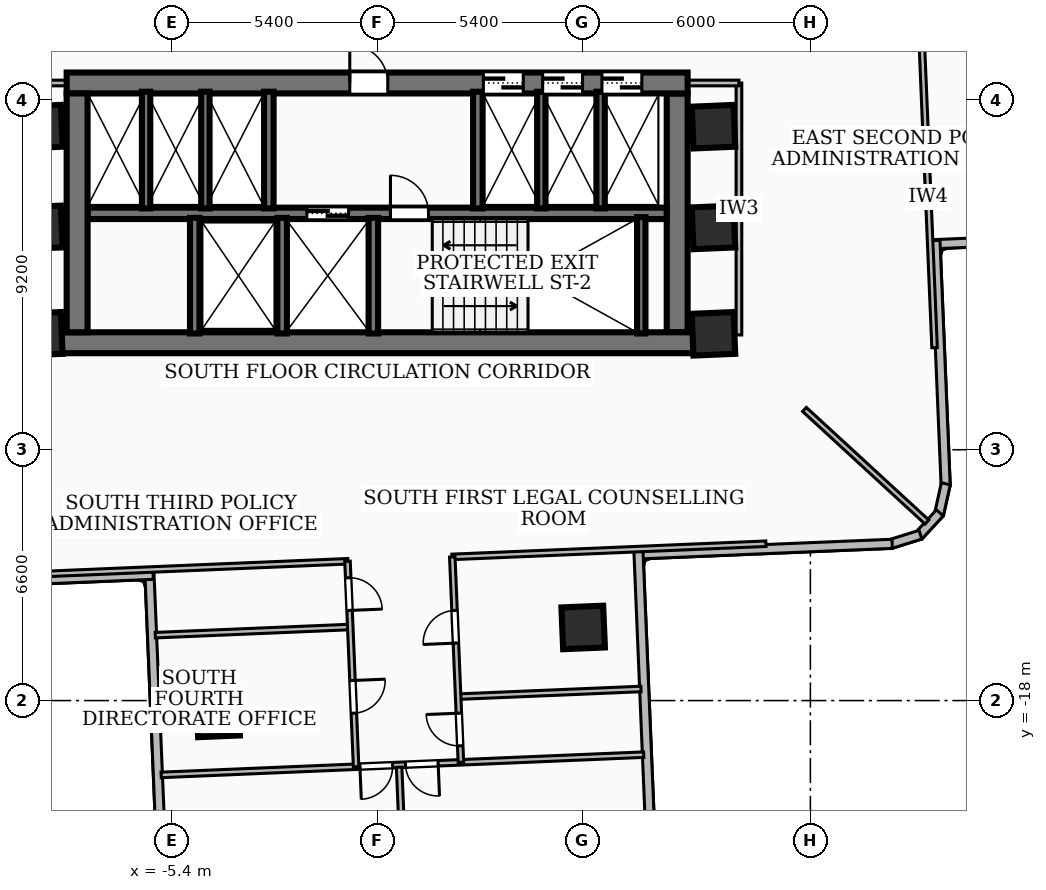
"""IFC4 building model, lengths in metres.
Left out: names, types, materials, properties, quantities, classifications, styles, units other than length and angle.
Written with IfcOpenShell. Run it as: python <this file> out.ifc"""

import sys

from ifc_helpers import new_model, si_unit, direction, frame, frame_2d, origin, origin_2d, place, context, subcontext, project, spatial, rectangle, extrude, element, fill, save


model = new_model("IFC4")
c1 = context("Model", 3, precision=1e-05, world=origin(), true_north=direction((0.0, 1.0)))
c2 = subcontext(c1, "Body", "Model", "MODEL_VIEW")
j1 = project(units=[si_unit("LENGTHUNIT", "METRE"), si_unit("PLANEANGLEUNIT", "RADIAN")], contexts=[c1])
p1 = place(None, origin())
s1 = spatial("IfcSite", under=j1, at=p1, CompositionType="ELEMENT")
p2 = place(p1, origin())
s2 = spatial("IfcBuilding", under=s1, at=p2, CompositionType="ELEMENT")
p3 = place(p2, frame((0.0, 0.0, 46.08)))
s3 = spatial("IfcBuildingStorey", under=s2, at=p3, CompositionType="ELEMENT", Elevation=46.08)
p4 = place(p3, frame((8.78, -8.585, 0.0), z_axis=(0.0, 0.0, 1.0), x_axis=(-1.0, 0.0, 0.0)))
e1 = element("IfcWall", 1, at=p4, inside=s3, PredefinedType="SHEAR", context=c2, shape_type="SweptSolid", body=[
    extrude(rectangle(XDim=17.56, YDim=0.55, at=frame_2d((8.78, 0.0))), origin(), (0.0, 0.0, 1.0), 3.32),
])
p5 = place(p3, frame((-8.17, -1.75, 0.0), z_axis=(0.0, 0.0, 1.0), x_axis=(1.0, 0.0, 0.0)))
e2 = element("IfcWall", 2, at=p5, inside=s3, PredefinedType="SHEAR", context=c2, shape_type="SweptSolid", body=[
    extrude(rectangle(XDim=16.34, YDim=0.55, at=frame_2d((8.17, 0.0))), origin(), (0.0, 0.0, 1.0), 3.32),
])
p6 = place(p5, frame((7.45, 0.0, 0.0)))
e3 = element("IfcOpeningElement", 3, at=p6, cuts=e2, PredefinedType="OPENING", context=c2, shape_type="SweptSolid", body=[
    extrude(rectangle(XDim=1.0, YDim=2.1, at=frame_2d((0.5, 1.05))), frame((0.0, 0.285, 0.0), z_axis=(0.0, -1.0, 0.0), x_axis=(1.0, 0.0, 0.0)), (0.0, 0.0, 1.0), 0.57),
])
p7 = place(p5, frame((10.965, 0.0, 0.0)))
e4 = element("IfcOpeningElement", 4, at=p7, cuts=e2, PredefinedType="OPENING", context=c2, shape_type="SweptSolid", body=[
    extrude(rectangle(XDim=1.05, YDim=2.15, at=frame_2d((0.525, 1.075))), frame((0.0, 0.285, 0.0), z_axis=(0.0, -1.0, 0.0), x_axis=(1.0, 0.0, 0.0)), (0.0, 0.0, 1.0), 0.57),
])
p8 = place(p5, frame((12.525, 0.0, 0.0)))
e5 = element("IfcOpeningElement", 5, at=p8, cuts=e2, PredefinedType="OPENING", context=c2, shape_type="SweptSolid", body=[
    extrude(rectangle(XDim=1.05, YDim=2.15, at=frame_2d((0.525, 1.075))), frame((0.0, 0.285, 0.0), z_axis=(0.0, -1.0, 0.0), x_axis=(1.0, 0.0, 0.0)), (0.0, 0.0, 1.0), 0.57),
])
p9 = place(p5, frame((14.085, 0.0, 0.0)))
e6 = element("IfcOpeningElement", 6, at=p9, cuts=e2, PredefinedType="OPENING", context=c2, shape_type="SweptSolid", body=[
    extrude(rectangle(XDim=1.05, YDim=2.15, at=frame_2d((0.525, 1.075))), frame((0.0, 0.285, 0.0), z_axis=(0.0, -1.0, 0.0), x_axis=(1.0, 0.0, 0.0)), (0.0, 0.0, 1.0), 0.57),
])
for number, where, z_axis, x_axis in (
    (7, (-7.895, -8.31, 0.0), (0.0, 0.0, 1.0), (0.0, 1.0, 0.0)),
    (8, (7.895, -2.025, 0.0), (0.0, 0.0, 1.0), (0.0, -1.0, 0.0)),
):
    element("IfcWall", number, at=place(p3, frame(where, z_axis=z_axis, x_axis=x_axis)), inside=s3, PredefinedType="SHEAR", context=c2, shape_type="SweptSolid", body=[
        extrude(rectangle(XDim=6.285, YDim=0.55, at=frame_2d((3.143, 0.0))), origin(), (0.0, 0.0, 1.0), 3.32),
    ])
p10 = place(p3, frame((-7.62, -5.18, 0.0), z_axis=(0.0, 0.0, 1.0), x_axis=(1.0, 0.0, 0.0)))
e9 = element("IfcWall", 9, at=p10, inside=s3, PredefinedType="SOLIDWALL", context=c2, shape_type="SweptSolid", body=[
    extrude(rectangle(XDim=15.24, YDim=0.3, at=frame_2d((7.62, 0.0))), origin(), (0.0, 0.0, 1.0), 3.32),
])
p11 = place(p10, frame((5.77, 0.0, 0.0)))
e10 = element("IfcOpeningElement", 10, at=p11, cuts=e9, PredefinedType="OPENING", context=c2, shape_type="SweptSolid", body=[
    extrude(rectangle(XDim=1.1, YDim=2.15, at=frame_2d((0.55, 1.075))), frame((0.0, 0.16, 0.0), z_axis=(0.0, -1.0, 0.0), x_axis=(1.0, 0.0, 0.0)), (0.0, 0.0, 1.0), 0.32),
])
p12 = place(p10, frame((7.97, 0.0, 0.0)))
e11 = element("IfcOpeningElement", 11, at=p12, cuts=e9, PredefinedType="OPENING", context=c2, shape_type="SweptSolid", body=[
    extrude(rectangle(XDim=1.0, YDim=2.1, at=frame_2d((0.5, 1.05))), frame((0.0, 0.16, 0.0), z_axis=(0.0, -1.0, 0.0), x_axis=(1.0, 0.0, 0.0)), (0.0, 0.0, 1.0), 0.32),
])
p13 = place(p3, frame((6.95, -8.34, 0.0), z_axis=(0.0, 0.0, 1.0), x_axis=(0.0, 1.0, 0.0)))
e12 = element("IfcWall", 12, at=p13, inside=s3, PredefinedType="SOLIDWALL", context=c2, shape_type="SweptSolid", body=[
    extrude(rectangle(XDim=3.06, YDim=0.22, at=frame_2d((1.53, 0.0))), origin(), (0.0, 0.0, 1.0), 3.32),
])
for number, where, z_axis, x_axis in (
    (13, (-0.1, -8.34, 0.0), (0.0, 0.0, 1.0), (0.0, 1.0, 0.0)),
    (14, (-2.5, -8.34, 0.0), (0.0, 0.0, 1.0), (0.0, 1.0, 0.0)),
    (15, (-4.8, -8.34, 0.0), (0.0, 0.0, 1.0), (0.0, 1.0, 0.0)),
):
    element("IfcWall", number, at=place(p3, frame(where, z_axis=z_axis, x_axis=x_axis)), inside=s3, PredefinedType="SOLIDWALL", context=c2, shape_type="SweptSolid", body=[
        extrude(rectangle(XDim=3.04, YDim=0.25, at=frame_2d((1.52, 0.0))), origin(), (0.0, 0.0, 1.0), 3.32),
    ])
for number, where, z_axis, x_axis in (
    (16, (-2.85, -5.05, 0.0), (0.0, 0.0, 1.0), (0.0, 1.0, 0.0)),
    (17, (2.65, -5.05, 0.0), (0.0, 0.0, 1.0), (0.0, 1.0, 0.0)),
):
    element("IfcWall", number, at=place(p3, frame(where, z_axis=z_axis, x_axis=x_axis)), inside=s3, PredefinedType="SOLIDWALL", context=c2, shape_type="SweptSolid", body=[
        extrude(rectangle(XDim=3.07, YDim=0.25, at=frame_2d((1.535, 0.0))), origin(), (0.0, 0.0, 1.0), 3.32),
    ])
for number, where, z_axis, x_axis in (
    (18, (4.32, -5.05, 0.0), (0.0, 0.0, 1.0), (0.0, 1.0, 0.0)),
    (19, (5.88, -5.05, 0.0), (0.0, 0.0, 1.0), (0.0, 1.0, 0.0)),
    (20, (-6.08, -5.05, 0.0), (0.0, 0.0, 1.0), (0.0, 1.0, 0.0)),
    (21, (-4.52, -5.05, 0.0), (0.0, 0.0, 1.0), (0.0, 1.0, 0.0)),
):
    element("IfcWall", number, at=place(p3, frame(where, z_axis=z_axis, x_axis=x_axis)), inside=s3, PredefinedType="SOLIDWALL", context=c2, shape_type="SweptSolid", body=[
        extrude(rectangle(XDim=3.07, YDim=0.22, at=frame_2d((1.535, 0.0))), origin(), (0.0, 0.0, 1.0), 3.32),
    ])
for number, where, z_axis, x_axis in (
    (22, (-8.85, -5.55, 0.0), (0.0, 0.0, 1.0), (0.999, 0.042, 0.0)),
    (23, (-8.85, -2.9, 0.0), (0.0, 0.0, 1.0), (0.999, 0.042, 0.0)),
    (24, (8.85, -5.55, 0.0), (0.0, 0.0, 1.0), (0.999, 0.042, 0.0)),
    (25, (8.85, -2.9, 0.0), (0.0, 0.0, 1.0), (0.999, 0.042, 0.0)),
    (26, (8.85, -8.35, 0.0), (0.0, 0.0, 1.0), (0.999, 0.042, 0.0)),
    (27, (-8.85, -8.35, 0.0), (0.0, 0.0, 1.0), (0.999, 0.042, 0.0)),
    (28, (-4.184, -18.391, 0.0), (0.0, 0.0, 1.0), (0.999, 0.042, 0.0)),
    (29, (5.421, -16.076, 0.0), (0.0, 0.0, 1.0), (0.999, 0.042, 0.0)),
):
    element("IfcColumn", number, at=place(p3, frame(where, z_axis=z_axis, x_axis=x_axis)), inside=s3, PredefinedType="COLUMN", context=c2, shape_type="SweptSolid", body=[
        extrude(rectangle(XDim=1.1, YDim=1.1, at=origin_2d()), origin(), (0.0, 0.0, 1.0), 3.6),
    ])
p14 = place(p3, frame((31.458, -5.287, 0.0), z_axis=(0.0, 0.0, 1.0), x_axis=(-0.999122484842, -0.041883890494, 0.0)))
e30 = element("IfcWall", 30, at=p14, inside=s3, PredefinedType="SOLIDWALL", context=c2, shape_type="SweptSolid", body=[
    extrude(rectangle(XDim=16.875, YDim=0.24, at=frame_2d((8.438, 0.0))), origin(), (0.0, 0.0, 1.0), 3.32),
])
p15 = place(p14, frame((1.1, 0.0, 0.85)))
e31 = element("IfcOpeningElement", 31, at=p15, cuts=e30, PredefinedType="OPENING", context=c2, shape_type="SweptSolid", body=[
    extrude(rectangle(XDim=2.7, YDim=2.1, at=frame_2d((1.35, 1.05))), frame((0.0, 0.13, 0.0), z_axis=(0.0, -1.0, 0.0), x_axis=(1.0, 0.0, 0.0)), (0.0, 0.0, 1.0), 0.26),
])
p16 = place(p3, frame((14.69, -5.894, 0.0), z_axis=(0.0, 0.0, 1.0), x_axis=(0.041827173477, -0.999124860845, 0.0)))
e32 = element("IfcWall", 32, at=p16, inside=s3, PredefinedType="SOLIDWALL", context=c2, shape_type="SweptSolid", body=[
    extrude(rectangle(XDim=6.456, YDim=0.24, at=frame_2d((3.228, 0.0))), origin(), (0.0, 0.0, 1.0), 3.32),
])
p17 = place(p3, frame((14.964, -12.295, 0.0), z_axis=(0.0, 0.0, 1.0), x_axis=(-0.21736704137, -0.976089939158, 0.0)))
e33 = element("IfcWall", 33, at=p17, inside=s3, PredefinedType="SOLIDWALL", context=c2, shape_type="SweptSolid", body=[
    extrude(rectangle(XDim=0.829, YDim=0.24, at=frame_2d((0.415, 0.0))), origin(), (0.0, 0.0, 1.0), 3.32),
])
p18 = place(p3, frame((14.806, -13.062, 0.0), z_axis=(0.0, 0.0, 1.0), x_axis=(-0.677693750404, -0.735344259965, 0.0)))
e34 = element("IfcWall", 34, at=p18, inside=s3, PredefinedType="SOLIDWALL", context=c2, shape_type="SweptSolid", body=[
    extrude(rectangle(XDim=0.813, YDim=0.24, at=frame_2d((0.406, 0.0))), origin(), (0.0, 0.0, 1.0), 3.32),
])
p19 = place(p3, frame((14.296, -13.635, 0.0), z_axis=(0.0, 0.0, 1.0), x_axis=(-0.954396284631, -0.298542680168, 0.0)))
e35 = element("IfcWall", 35, at=p19, inside=s3, PredefinedType="SOLIDWALL", context=c2, shape_type="SweptSolid", body=[
    extrude(rectangle(XDim=0.831, YDim=0.24, at=frame_2d((0.416, 0.0))), origin(), (0.0, 0.0, 1.0), 3.32),
])
p20 = place(p3, frame((13.552, -13.875, 0.0), z_axis=(0.0, 0.0, 1.0), x_axis=(-0.999127443157, -0.041765444226, 0.0)))
e36 = element("IfcWall", 36, at=p20, inside=s3, PredefinedType="SOLIDWALL", context=c2, shape_type="SweptSolid", body=[
    extrude(rectangle(XDim=6.775, YDim=0.24, at=frame_2d((3.387, 0.0))), origin(), (0.0, 0.0, 1.0), 3.32),
])
p21 = place(p3, frame((6.875, -14.058, 0.0), z_axis=(0.0, 0.0, 1.0), x_axis=(0.041850586852, -0.999123880397, 0.0)))
e37 = element("IfcWall", 37, at=p21, inside=s3, PredefinedType="SOLIDWALL", context=c2, shape_type="SweptSolid", body=[
    extrude(rectangle(XDim=13.476, YDim=0.24, at=frame_2d((6.738, 0.0))), origin(), (0.0, 0.0, 1.0), 3.32),
])
p22 = place(p21, frame((10.276, 0.0, 0.85)))
e38 = element("IfcOpeningElement", 38, at=p22, cuts=e37, PredefinedType="OPENING", context=c2, shape_type="SweptSolid", body=[
    extrude(rectangle(XDim=2.1, YDim=1.6, at=frame_2d((1.05, 0.8))), frame((0.0, 0.13, 0.0), z_axis=(0.0, -1.0, 0.0), x_axis=(1.0, 0.0, 0.0)), (0.0, 0.0, 1.0), 0.26),
])
p23 = place(p3, frame((-5.43, -28.061, 0.0), z_axis=(0.0, 0.0, 1.0), x_axis=(-0.041852859621, 0.999123785195, 0.0)))
e39 = element("IfcWall", 39, at=p23, inside=s3, PredefinedType="SOLIDWALL", context=c2, shape_type="SweptSolid", body=[
    extrude(rectangle(XDim=13.475, YDim=0.24, at=frame_2d((6.737, 0.0))), origin(), (0.0, 0.0, 1.0), 2.401),
])
p24 = place(p3, frame((-5.894, -14.69, 0.0), z_axis=(0.0, 0.0, 1.0), x_axis=(-0.999124860845, -0.041827173477, 0.0)))
e40 = element("IfcWall", 40, at=p24, inside=s3, PredefinedType="SOLIDWALL", context=c2, shape_type="SweptSolid", body=[
    extrude(rectangle(XDim=6.456, YDim=0.24, at=frame_2d((3.228, 0.0))), origin(), (0.0, 0.0, 1.0), 2.401),
])
p25 = place(p3, frame((-7.85, -1.75, 0.0), z_axis=(0.0, 0.0, 1.0), x_axis=(-1.0, 0.0, 0.0)))
e41 = element("IfcWall", 41, at=p25, inside=s3, PredefinedType="PARTITIONING", context=c2, shape_type="SweptSolid", body=[
    extrude(rectangle(XDim=1.67, YDim=0.15, at=frame_2d((0.835, 0.0))), origin(), (0.0, 0.0, 1.0), 2.385),
])
p26 = place(p3, frame((9.52, -8.38, 0.0), z_axis=(0.0, 0.0, 1.0), x_axis=(0.0, 1.0, 0.0)))
e42 = element("IfcWall", 42, at=p26, inside=s3, PredefinedType="PARTITIONING", context=c2, shape_type="SweptSolid", body=[
    extrude(rectangle(XDim=6.63, YDim=0.15, at=frame_2d((3.315, 0.0))), origin(), (0.0, 0.0, 1.0), 2.401),
])
p27 = place(p3, frame((7.85, -1.75, 0.0), z_axis=(0.0, 0.0, 1.0), x_axis=(1.0, 0.0, 0.0)))
e43 = element("IfcWall", 43, at=p27, inside=s3, PredefinedType="PARTITIONING", context=c2, shape_type="SweptSolid", body=[
    extrude(rectangle(XDim=1.67, YDim=0.15, at=frame_2d((0.835, 0.0))), origin(), (0.0, 0.0, 1.0), 2.385),
])
p28 = place(p3, frame((11.245, -10.34, 0.0), z_axis=(0.0, 0.0, 1.0), x_axis=(0.736178820698, -0.676787074312, 0.0)))
e44 = element("IfcWall", 44, at=p28, inside=s3, PredefinedType="PARTITIONING", context=c2, shape_type="SweptSolid", body=[
    extrude(rectangle(XDim=4.378, YDim=0.145, at=frame_2d((2.189, 0.0))), origin(), (0.0, 0.0, 1.0), 3.32),
])
p29 = place(p3, frame((14.668, -8.714, 0.0), z_axis=(0.0, 0.0, 1.0), x_axis=(-0.041882146625, 0.999122557945, 0.0)))
e45 = element("IfcWall", 45, at=p29, inside=s3, PredefinedType="PARTITIONING", context=c2, shape_type="SweptSolid", body=[
    extrude(rectangle(XDim=7.951, YDim=0.145, at=frame_2d((3.976, 0.0))), origin(), (0.0, 0.0, 1.0), 2.401),
])
p30 = place(p3, frame((1.967, -14.22, 0.0), z_axis=(0.0, 0.0, 1.0), x_axis=(0.99911977153, 0.041948565382, 0.0)))
e46 = element("IfcWall", 46, at=p30, inside=s3, PredefinedType="PARTITIONING", context=c2, shape_type="SweptSolid", body=[
    extrude(rectangle(XDim=8.27, YDim=0.145, at=frame_2d((4.135, 0.0))), origin(), (0.0, 0.0, 1.0), 2.401),
])
p31 = place(p3, frame((-8.714, -14.668, 0.0), z_axis=(0.0, 0.0, 1.0), x_axis=(0.999122557945, 0.041882146625, 0.0)))
e47 = element("IfcWall", 47, at=p31, inside=s3, PredefinedType="PARTITIONING", context=c2, shape_type="SweptSolid", body=[
    extrude(rectangle(XDim=7.951, YDim=0.145, at=frame_2d((3.976, 0.0))), origin(), (0.0, 0.0, 1.0), 2.401),
])
p32 = place(p3, frame((2.151, -17.896, 0.0), z_axis=(0.0, 0.0, 1.0), x_axis=(0.999121741873, 0.041901609945, 0.0)))
e48 = element("IfcWall", 48, at=p32, inside=s3, PredefinedType="PARTITIONING", context=c2, shape_type="SweptSolid", body=[
    extrude(rectangle(XDim=4.795, YDim=0.145, at=frame_2d((2.397, 0.0))), origin(), (0.0, 0.0, 1.0), 2.401),
])
p33 = place(p3, frame((-5.838, -16.279, 0.0), z_axis=(0.0, 0.0, 1.0), x_axis=(0.999123283233, 0.041864840869, 0.0)))
e49 = element("IfcWall", 49, at=p33, inside=s3, PredefinedType="PARTITIONING", context=c2, shape_type="SweptSolid", body=[
    extrude(rectangle(XDim=5.114, YDim=0.145, at=frame_2d((2.557, 0.0))), origin(), (0.0, 0.0, 1.0), 2.401),
])
p34 = place(p3, frame((2.204, -19.625, 0.0), z_axis=(0.0, 0.0, 1.0), x_axis=(-0.041970303018, 0.999118858627, 0.0)))
e50 = element("IfcWall", 50, at=p34, inside=s3, PredefinedType="PARTITIONING", context=c2, shape_type="SweptSolid", body=[
    extrude(rectangle(XDim=5.41, YDim=0.145, at=frame_2d((2.705, 0.0))), origin(), (0.0, 0.0, 1.0), 3.32),
])
p35 = place(p34, frame((3.14, 0.0, 0.0)))
e51 = element("IfcOpeningElement", 51, at=p35, cuts=e50, PredefinedType="OPENING", context=c2, shape_type="SweptSolid", body=[
    extrude(rectangle(XDim=0.86, YDim=2.04, at=frame_2d((0.43, 1.02))), frame((0.0, 0.083, 0.0), z_axis=(0.0, -1.0, 0.0), x_axis=(1.0, 0.0, 0.0)), (0.0, 0.0, 1.0), 0.165),
])
p36 = place(p34, frame((0.435, 0.0, 0.0)))
e52 = element("IfcOpeningElement", 52, at=p36, cuts=e50, PredefinedType="OPENING", context=c2, shape_type="SweptSolid", body=[
    extrude(rectangle(XDim=0.86, YDim=2.04, at=frame_2d((0.43, 1.02))), frame((0.0, 0.083, 0.0), z_axis=(0.0, -1.0, 0.0), x_axis=(1.0, 0.0, 0.0)), (0.0, 0.0, 1.0), 0.165),
])
p37 = place(p3, frame((-0.78, -14.335, 0.0), z_axis=(0.0, 0.0, 1.0), x_axis=(0.041782565573, -0.999126727304, 0.0)))
e53 = element("IfcWall", 53, at=p37, inside=s3, PredefinedType="PARTITIONING", context=c2, shape_type="SweptSolid", body=[
    extrude(rectangle(XDim=5.411, YDim=0.145, at=frame_2d((2.705, 0.0))), origin(), (0.0, 0.0, 1.0), 3.32),
])
p38 = place(p37, frame((0.435, 0.0, 0.0)))
e54 = element("IfcOpeningElement", 54, at=p38, cuts=e53, PredefinedType="OPENING", context=c2, shape_type="SweptSolid", body=[
    extrude(rectangle(XDim=0.86, YDim=2.04, at=frame_2d((0.43, 1.02))), frame((0.0, 0.083, 0.0), z_axis=(0.0, -1.0, 0.0), x_axis=(1.0, 0.0, 0.0)), (0.0, 0.0, 1.0), 0.165),
])
p39 = place(p37, frame((3.14, 0.0, 0.0)))
e55 = element("IfcOpeningElement", 55, at=p39, cuts=e53, PredefinedType="OPENING", context=c2, shape_type="SweptSolid", body=[
    extrude(rectangle(XDim=0.86, YDim=2.04, at=frame_2d((0.43, 1.02))), frame((0.0, 0.083, 0.0), z_axis=(0.0, -1.0, 0.0), x_axis=(1.0, 0.0, 0.0)), (0.0, 0.0, 1.0), 0.165),
])
p40 = place(p3, frame((0.578, -19.753, 0.0), z_axis=(0.0, 0.0, 1.0), x_axis=(0.041866246522, -0.999123224333, 0.0)))
e56 = element("IfcWall", 56, at=p40, inside=s3, PredefinedType="PARTITIONING", context=c2, shape_type="SweptSolid", body=[
    extrude(rectangle(XDim=9.435, YDim=0.145, at=frame_2d((4.718, 0.0))), origin(), (0.0, 0.0, 1.0), 2.812),
])
p41 = place(p3, frame((7.015, -19.423, 0.0), z_axis=(0.0, 0.0, 1.0), x_axis=(-0.99912047737, -0.041931750497, 0.0)))
e57 = element("IfcWall", 57, at=p41, inside=s3, PredefinedType="PARTITIONING", context=c2, shape_type="SweptSolid", body=[
    extrude(rectangle(XDim=12.71, YDim=0.145, at=frame_2d((6.355, 0.0))), origin(), (0.0, 0.0, 1.0), 2.401),
])
p42 = place(p41, frame((6.615, 0.0, 0.0)))
e58 = element("IfcOpeningElement", 58, at=p42, cuts=e57, PredefinedType="OPENING", context=c2, shape_type="SweptSolid", body=[
    extrude(rectangle(XDim=0.86, YDim=2.04, at=frame_2d((0.43, 1.02))), frame((0.0, 0.083, 0.0), z_axis=(0.0, -1.0, 0.0), x_axis=(1.0, 0.0, 0.0)), (0.0, 0.0, 1.0), 0.165),
])
p43 = place(p41, frame((5.415, 0.0, 0.0)))
e59 = element("IfcOpeningElement", 59, at=p43, cuts=e57, PredefinedType="OPENING", context=c2, shape_type="SweptSolid", body=[
    extrude(rectangle(XDim=0.86, YDim=2.04, at=frame_2d((0.43, 1.02))), frame((0.0, 0.083, 0.0), z_axis=(0.0, -1.0, 0.0), x_axis=(1.0, 0.0, 0.0)), (0.0, 0.0, 1.0), 0.165),
])
p44 = place(p6, origin())
e60 = element("IfcDoor", 60, at=p44, inside=s3, OperationType="SINGLE_SWING_LEFT", PredefinedType="DOOR", context=c2, shape_type="SweptSolid", body=[
    extrude(rectangle(XDim=1.0, YDim=2.1, at=frame_2d((0.5, 1.05))), frame((0.0, 0.025, 0.0), z_axis=(0.0, -1.0, 0.0), x_axis=(1.0, 0.0, 0.0)), (0.0, 0.0, 1.0), 0.05),
])
fill(e3, e60)
p45 = place(p11, origin())
e61 = element("IfcDoor", 61, at=p45, inside=s3, OperationType="DOUBLE_DOOR_SLIDING", PredefinedType="DOOR", context=c2, shape_type="SweptSolid", body=[
    extrude(rectangle(XDim=1.1, YDim=2.15, at=frame_2d((0.55, 1.075))), frame((0.0, 0.025, 0.0), z_axis=(0.0, -1.0, 0.0), x_axis=(1.0, 0.0, 0.0)), (0.0, 0.0, 1.0), 0.05),
])
fill(e10, e61)
p46 = place(p12, origin())
e62 = element("IfcDoor", 62, at=p46, inside=s3, OperationType="SINGLE_SWING_LEFT", PredefinedType="DOOR", context=c2, shape_type="SweptSolid", body=[
    extrude(rectangle(XDim=1.0, YDim=2.1, at=frame_2d((0.5, 1.05))), frame((0.0, 0.025, 0.0), z_axis=(0.0, -1.0, 0.0), x_axis=(1.0, 0.0, 0.0)), (0.0, 0.0, 1.0), 0.05),
])
fill(e11, e62)
p47 = place(p7, origin())
e63 = element("IfcDoor", 63, at=p47, inside=s3, OperationType="DOUBLE_DOOR_SLIDING", PredefinedType="DOOR", context=c2, shape_type="SweptSolid", body=[
    extrude(rectangle(XDim=1.05, YDim=2.15, at=frame_2d((0.525, 1.075))), frame((0.0, 0.025, 0.0), z_axis=(0.0, -1.0, 0.0), x_axis=(1.0, 0.0, 0.0)), (0.0, 0.0, 1.0), 0.05),
])
fill(e4, e63)
p48 = place(p8, origin())
e64 = element("IfcDoor", 64, at=p48, inside=s3, OperationType="DOUBLE_DOOR_SLIDING", PredefinedType="DOOR", context=c2, shape_type="SweptSolid", body=[
    extrude(rectangle(XDim=1.05, YDim=2.15, at=frame_2d((0.525, 1.075))), frame((0.0, 0.025, 0.0), z_axis=(0.0, -1.0, 0.0), x_axis=(1.0, 0.0, 0.0)), (0.0, 0.0, 1.0), 0.05),
])
fill(e5, e64)
p49 = place(p9, origin())
e65 = element("IfcDoor", 65, at=p49, inside=s3, OperationType="DOUBLE_DOOR_SLIDING", PredefinedType="DOOR", context=c2, shape_type="SweptSolid", body=[
    extrude(rectangle(XDim=1.05, YDim=2.15, at=frame_2d((0.525, 1.075))), frame((0.0, 0.025, 0.0), z_axis=(0.0, -1.0, 0.0), x_axis=(1.0, 0.0, 0.0)), (0.0, 0.0, 1.0), 0.05),
])
fill(e6, e65)
p50 = place(p35, origin())
e66 = element("IfcDoor", 66, at=p50, inside=s3, OperationType="SINGLE_SWING_LEFT", PredefinedType="DOOR", context=c2, shape_type="SweptSolid", body=[
    extrude(rectangle(XDim=0.86, YDim=2.04, at=frame_2d((0.43, 1.02))), frame((0.0, 0.025, 0.0), z_axis=(0.0, -1.0, 0.0), x_axis=(1.0, 0.0, 0.0)), (0.0, 0.0, 1.0), 0.05),
])
fill(e51, e66)
p51 = place(p36, origin())
e67 = element("IfcDoor", 67, at=p51, inside=s3, OperationType="SINGLE_SWING_RIGHT", PredefinedType="DOOR", context=c2, shape_type="SweptSolid", body=[
    extrude(rectangle(XDim=0.86, YDim=2.04, at=frame_2d((0.43, 1.02))), frame((0.0, 0.025, 0.0), z_axis=(0.0, -1.0, 0.0), x_axis=(1.0, 0.0, 0.0)), (0.0, 0.0, 1.0), 0.05),
])
fill(e52, e67)
p52 = place(p38, origin())
e68 = element("IfcDoor", 68, at=p52, inside=s3, OperationType="SINGLE_SWING_RIGHT", PredefinedType="DOOR", context=c2, shape_type="SweptSolid", body=[
    extrude(rectangle(XDim=0.86, YDim=2.04, at=frame_2d((0.43, 1.02))), frame((0.0, 0.025, 0.0), z_axis=(0.0, -1.0, 0.0), x_axis=(1.0, 0.0, 0.0)), (0.0, 0.0, 1.0), 0.05),
])
fill(e54, e68)
p53 = place(p39, origin())
e69 = element("IfcDoor", 69, at=p53, inside=s3, OperationType="SINGLE_SWING_LEFT", PredefinedType="DOOR", context=c2, shape_type="SweptSolid", body=[
    extrude(rectangle(XDim=0.86, YDim=2.04, at=frame_2d((0.43, 1.02))), frame((0.0, 0.025, 0.0), z_axis=(0.0, -1.0, 0.0), x_axis=(1.0, 0.0, 0.0)), (0.0, 0.0, 1.0), 0.05),
])
fill(e55, e69)
p54 = place(p42, origin())
e70 = element("IfcDoor", 70, at=p54, inside=s3, OperationType="SINGLE_SWING_RIGHT", PredefinedType="DOOR", context=c2, shape_type="SweptSolid", body=[
    extrude(rectangle(XDim=0.86, YDim=2.04, at=frame_2d((0.43, 1.02))), frame((0.0, 0.025, 0.0), z_axis=(0.0, -1.0, 0.0), x_axis=(1.0, 0.0, 0.0)), (0.0, 0.0, 1.0), 0.05),
])
fill(e58, e70)
p55 = place(p43, origin())
e71 = element("IfcDoor", 71, at=p55, inside=s3, OperationType="SINGLE_SWING_LEFT", PredefinedType="DOOR", context=c2, shape_type="SweptSolid", body=[
    extrude(rectangle(XDim=0.86, YDim=2.04, at=frame_2d((0.43, 1.02))), frame((0.0, 0.025, 0.0), z_axis=(0.0, -1.0, 0.0), x_axis=(1.0, 0.0, 0.0)), (0.0, 0.0, 1.0), 0.05),
])
fill(e59, e71)
save(model, sys.argv[1])
